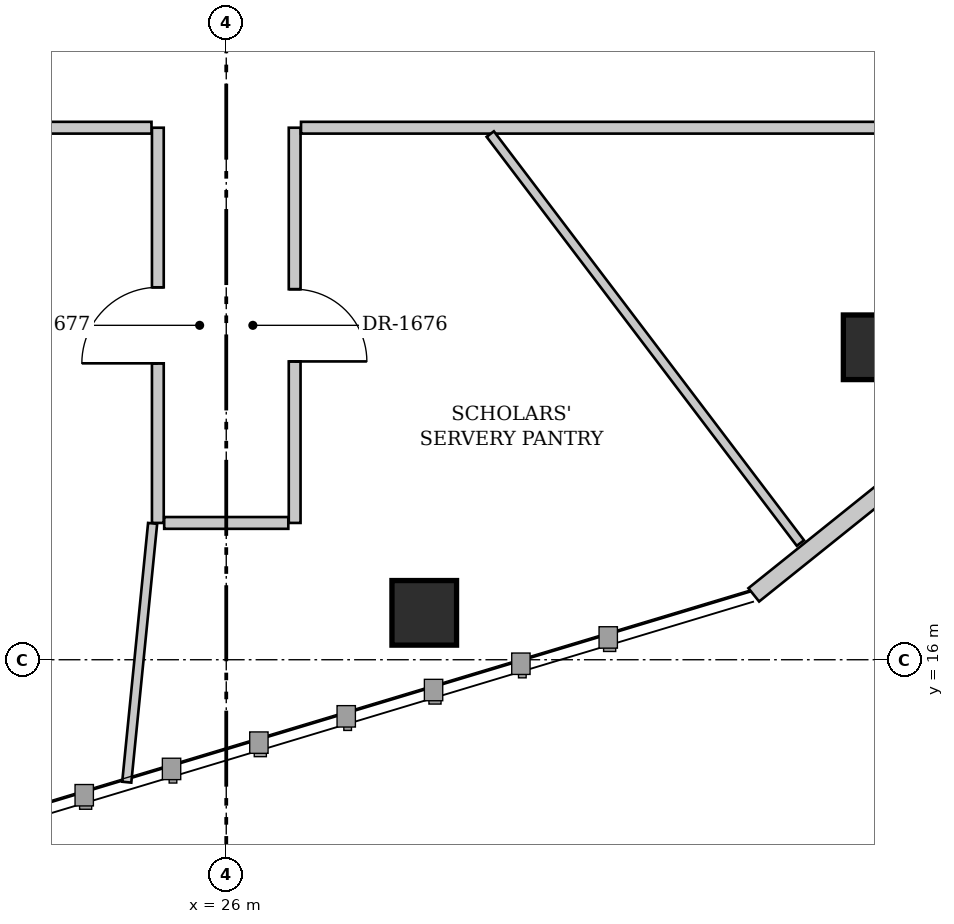
"""IFC4 building model, lengths in metres.
Left out: names, types, materials, properties, quantities, classifications, styles, units other than length and angle.
Written with IfcOpenShell. Run it as: python <this file> out.ifc"""

import sys

from ifc_helpers import new_model, si_unit, direction, frame, frame_2d, origin, origin_2d, place, context, subcontext, project, spatial, rectangle, extrude, source, transform, mapped, element, fill, save


model = new_model("IFC4")
c1 = context("Model", 3, precision=1e-05, world=origin(), true_north=direction((0.0, 1.0)))
c2 = subcontext(c1, "Body", "Model", "MODEL_VIEW")
j1 = project(units=[si_unit("LENGTHUNIT", "METRE"), si_unit("PLANEANGLEUNIT", "RADIAN")], contexts=[c1])
p1 = place(None, origin())
s1 = spatial("IfcSite", under=j1, at=p1, CompositionType="ELEMENT")
p2 = place(p1, origin())
s2 = spatial("IfcBuilding", under=s1, at=p2, CompositionType="ELEMENT")
p3 = place(p2, frame((0.0, 0.0, 291.8)))
s3 = spatial("IfcBuildingStorey", under=s2, at=p3, CompositionType="ELEMENT", Elevation=291.8)
for number, where, z_axis, x_axis in (
    (1, (34.544, 20.111, 0.0), (0.0, 0.0, 1.0), (1.0, 0.0, 0.0)),
    (2, (28.605, 16.617, 0.0), (0.0, 0.0, 1.0), (1.0, 0.0, 0.0)),
):
    element("IfcColumn", number, at=place(p3, frame(where, z_axis=z_axis, x_axis=x_axis)), inside=s3, PredefinedType="COLUMN", context=c2, shape_type="SweptSolid", body=[
        extrude(rectangle(XDim=0.85, YDim=0.85, at=origin_2d()), origin(), (0.0, 0.0, 1.0), 3.94),
    ])
p4 = place(p3, frame((34.892, 18.42, 0.0), z_axis=(0.0, 0.0, 1.0), x_axis=(-0.77987797323, -0.625931583218, 0.0)))
e3 = element("IfcWall", 3, at=p4, inside=s3, PredefinedType="SOLIDWALL", context=c2, shape_type="SweptSolid", body=[
    extrude(rectangle(XDim=2.502, YDim=0.225, at=frame_2d((1.251, 0.0))), origin(), (0.0, 0.0, 1.0), 3.94),
])
p5 = place(p3, frame((26.9, 23.0, 0.0), z_axis=(0.0, 0.0, 1.0), x_axis=(0.0, -1.0, 0.0)))
e4 = element("IfcWall", 4, at=p5, inside=s3, PredefinedType="PARTITIONING", context=c2, shape_type="SweptSolid", body=[
    extrude(rectangle(XDim=5.2, YDim=0.155, at=frame_2d((2.6, 0.0))), origin(), (0.0, 0.0, 1.0), 3.94),
])
p6 = place(p5, frame((2.125, 0.0, 0.0)))
e5 = element("IfcOpeningElement", 5, at=p6, cuts=e4, PredefinedType="OPENING", context=c2, shape_type="SweptSolid", body=[
    extrude(rectangle(XDim=0.95, YDim=2.15, at=frame_2d((0.475, 1.075))), frame((0.0, 0.087, 0.0), z_axis=(0.0, -1.0, 0.0), x_axis=(1.0, 0.0, 0.0)), (0.0, 0.0, 1.0), 0.175),
])
p7 = place(p3, frame((25.1, 17.8, 0.0), z_axis=(0.0, 0.0, 1.0), x_axis=(0.0, 1.0, 0.0)))
e6 = element("IfcWall", 6, at=p7, inside=s3, PredefinedType="PARTITIONING", context=c2, shape_type="SweptSolid", body=[
    extrude(rectangle(XDim=5.2, YDim=0.155, at=frame_2d((2.6, 0.0))), origin(), (0.0, 0.0, 1.0), 3.94),
])
p8 = place(p7, frame((2.1, 0.0, 0.0)))
e7 = element("IfcOpeningElement", 7, at=p8, cuts=e6, PredefinedType="OPENING", context=c2, shape_type="SweptSolid", body=[
    extrude(rectangle(XDim=1.0, YDim=2.15, at=frame_2d((0.5, 1.075))), frame((0.0, 0.087, 0.0), z_axis=(0.0, -1.0, 0.0), x_axis=(1.0, 0.0, 0.0)), (0.0, 0.0, 1.0), 0.175),
])
p9 = place(p3, frame((25.017, 23.0, 0.0), z_axis=(0.0, 0.0, 1.0), x_axis=(-1.0, 0.0, 0.0)))
e8 = element("IfcWall", 8, at=p9, inside=s3, PredefinedType="PARTITIONING", context=c2, shape_type="SweptSolid", body=[
    extrude(rectangle(XDim=9.417, YDim=0.155, at=frame_2d((4.708, 0.0))), origin(), (0.0, 0.0, 1.0), 3.94),
])
p10 = place(p9, frame((5.776, 0.0, 0.0)))
e9 = element("IfcOpeningElement", 9, at=p10, cuts=e8, PredefinedType="OPENING", context=c2, shape_type="SweptSolid", body=[
    extrude(rectangle(XDim=0.95, YDim=2.15, at=frame_2d((0.475, 1.075))), frame((0.0, 0.087, 0.0), z_axis=(0.0, -1.0, 0.0), x_axis=(1.0, 0.0, 0.0)), (0.0, 0.0, 1.0), 0.175),
])
p11 = place(p3, frame((34.937, 23.0, 0.0), z_axis=(0.0, 0.0, 1.0), x_axis=(-1.0, 0.0, 0.0)))
e10 = element("IfcWall", 10, at=p11, inside=s3, PredefinedType="PARTITIONING", context=c2, shape_type="SweptSolid", body=[
    extrude(rectangle(XDim=7.953, YDim=0.155, at=frame_2d((3.977, 0.0))), origin(), (0.0, 0.0, 1.0), 3.94),
])
p12 = place(p3, frame((26.816, 17.8, 0.0), z_axis=(0.0, 0.0, 1.0), x_axis=(-1.0, 0.0, 0.0)))
e11 = element("IfcWall", 11, at=p12, inside=s3, PredefinedType="PARTITIONING", context=c2, shape_type="SweptSolid", body=[
    extrude(rectangle(XDim=1.633, YDim=0.155, at=frame_2d((0.816, 0.0))), origin(), (0.0, 0.0, 1.0), 3.94),
])
p13 = place(p3, frame((25.031, 17.794, 0.0), z_axis=(0.0, 0.0, 1.0), x_axis=(-0.099524910292, -0.995035070855, 0.0)))
e12 = element("IfcWall", 12, at=p13, inside=s3, PredefinedType="PARTITIONING", context=c2, shape_type="SweptSolid", body=[
    extrude(rectangle(XDim=3.422, YDim=0.12, at=frame_2d((1.711, 0.0))), origin(), (0.0, 0.0, 1.0), 3.94),
])
p14 = place(p3, frame((29.473, 22.917, 0.0), z_axis=(0.0, 0.0, 1.0), x_axis=(0.604213983141, -0.796822102214, 0.0)))
e13 = element("IfcWall", 13, at=p14, inside=s3, PredefinedType="PARTITIONING", context=c2, shape_type="SweptSolid", body=[
    extrude(rectangle(XDim=6.753, YDim=0.12, at=frame_2d((3.377, 0.0))), origin(), (0.0, 0.0, 1.0), 3.94),
])
m1 = source(origin(), c2, "Body", "SweptSolid", [
    extrude(rectangle(XDim=0.95, YDim=2.15, at=frame_2d((0.475, 1.075))), frame((0.0, 0.025, 0.0), z_axis=(0.0, -1.0, 0.0), x_axis=(1.0, 0.0, 0.0)), (0.0, 0.0, 1.0), 0.05),
])
p15 = place(p6, origin())
e14 = element("IfcDoor", 14, at=p15, inside=s3, OperationType="SINGLE_SWING_RIGHT", PredefinedType="DOOR", context=c2, shape_type="MappedRepresentation", body=[
    mapped(m1, transform((0.0, 0.0, 0.0), x_axis=(1.0, 0.0, 0.0), y_axis=(0.0, 1.0, 0.0), z_axis=(0.0, 0.0, 1.0), scale=1.0)),
])
fill(e5, e14)
m2 = source(origin(), c2, "Body", "SweptSolid", [
    extrude(rectangle(XDim=1.0, YDim=2.15, at=frame_2d((0.5, 1.075))), frame((0.0, 0.025, 0.0), z_axis=(0.0, -1.0, 0.0), x_axis=(1.0, 0.0, 0.0)), (0.0, 0.0, 1.0), 0.05),
])
p16 = place(p8, origin())
e15 = element("IfcDoor", 15, at=p16, inside=s3, OperationType="SINGLE_SWING_LEFT", PredefinedType="DOOR", context=c2, shape_type="MappedRepresentation", body=[
    mapped(m2, transform((0.0, 0.0, 0.0), x_axis=(1.0, 0.0, 0.0), y_axis=(0.0, 1.0, 0.0), z_axis=(0.0, 0.0, 1.0), scale=1.0)),
])
fill(e7, e15)
save(model, sys.argv[1])
